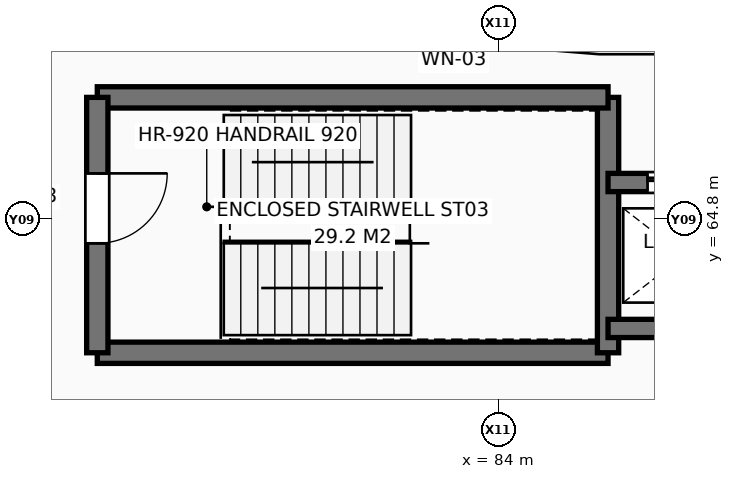
"""IFC4 building model, lengths in metres.
Left out: names, types, materials, properties, quantities, classifications, styles, units other than length and angle.
Written with IfcOpenShell. Run it as: python <this file> out.ifc"""

import sys

from ifc_helpers import new_model, si_unit, direction, frame, frame_2d, origin, place, context, subcontext, project, spatial, rectangle, extrude, element, fill, save


model = new_model("IFC4")
c1 = context("Model", 3, precision=1e-05, world=origin(), true_north=direction((0.0, 1.0)))
c2 = subcontext(c1, "Body", "Model", "MODEL_VIEW")
j1 = project(units=[si_unit("LENGTHUNIT", "METRE"), si_unit("PLANEANGLEUNIT", "RADIAN")], contexts=[c1])
p1 = place(None, origin())
s1 = spatial("IfcSite", under=j1, at=p1, CompositionType="ELEMENT")
p2 = place(p1, origin())
s2 = spatial("IfcBuilding", under=s1, at=p2, CompositionType="ELEMENT")
p3 = place(p2, frame((0.0, 0.0, 22.2)))
s3 = spatial("IfcBuildingStorey", under=s2, at=p3, CompositionType="ELEMENT", Elevation=22.2)
p4 = place(p3, frame((79.171, 68.104, 0.0), z_axis=(0.0, 0.0, 1.0), x_axis=(0.999197261913, -0.040060351782, 0.0)))
e1 = element("IfcWall", 1, at=p4, inside=s3, PredefinedType="SOLIDWALL", context=c2, shape_type="SweptSolid", body=[
    extrude(rectangle(XDim=13.097, YDim=0.34, at=frame_2d((6.548, 0.0))), origin(), (0.0, 0.0, 1.0), 3.387),
])
p5 = place(p4, frame((3.365, 0.0, 0.9)))
e2 = element("IfcOpeningElement", 2, at=p5, cuts=e1, PredefinedType="OPENING", context=c2, shape_type="SweptSolid", body=[
    extrude(rectangle(XDim=1.5, YDim=2.1, at=frame_2d((0.75, 1.05))), frame((0.0, 0.18, 0.0), z_axis=(0.0, -1.0, 0.0), x_axis=(1.0, 0.0, 0.0)), (0.0, 0.0, 1.0), 0.36),
])
p6 = place(p4, frame((8.231, 0.0, 0.9)))
e3 = element("IfcOpeningElement", 3, at=p6, cuts=e1, PredefinedType="OPENING", context=c2, shape_type="SweptSolid", body=[
    extrude(rectangle(XDim=1.5, YDim=2.1, at=frame_2d((0.75, 1.05))), frame((0.0, 0.18, 0.0), z_axis=(0.0, -1.0, 0.0), x_axis=(1.0, 0.0, 0.0)), (0.0, 0.0, 1.0), 0.36),
])
p7 = place(p3, frame((77.4, 62.6, 0.0), z_axis=(0.0, 0.0, 1.0), x_axis=(1.0, 0.0, 0.0)))
e4 = element("IfcWall", 4, at=p7, inside=s3, PredefinedType="SHEAR", context=c2, shape_type="SweptSolid", body=[
    extrude(rectangle(XDim=8.4, YDim=0.35, at=frame_2d((4.2, 0.0))), origin(), (0.0, 0.0, 1.0), 3.92),
])
p8 = place(p3, frame((85.8, 62.6, 0.0), z_axis=(0.0, 0.0, 1.0), x_axis=(0.0, 1.0, 0.0)))
e5 = element("IfcWall", 5, at=p8, inside=s3, PredefinedType="SHEAR", context=c2, shape_type="SweptSolid", body=[
    extrude(rectangle(XDim=4.2, YDim=0.35, at=frame_2d((2.1, 0.0))), origin(), (0.0, 0.0, 1.0), 3.92),
])
p9 = place(p3, frame((85.8, 66.8, 0.0), z_axis=(0.0, 0.0, 1.0), x_axis=(-1.0, 0.0, 0.0)))
e6 = element("IfcWall", 6, at=p9, inside=s3, PredefinedType="SHEAR", context=c2, shape_type="SweptSolid", body=[
    extrude(rectangle(XDim=8.4, YDim=0.35, at=frame_2d((4.2, 0.0))), origin(), (0.0, 0.0, 1.0), 3.92),
])
p10 = place(p3, frame((77.4, 66.8, 0.0), z_axis=(0.0, 0.0, 1.0), x_axis=(0.0, -1.0, 0.0)))
e7 = element("IfcWall", 7, at=p10, inside=s3, PredefinedType="SHEAR", context=c2, shape_type="SweptSolid", body=[
    extrude(rectangle(XDim=4.2, YDim=0.35, at=frame_2d((2.1, 0.0))), origin(), (0.0, 0.0, 1.0), 3.92),
])
p11 = place(p10, frame((1.25, 0.0, 0.0)))
e8 = element("IfcOpeningElement", 8, at=p11, cuts=e7, PredefinedType="OPENING", context=c2, shape_type="SweptSolid", body=[
    extrude(rectangle(XDim=1.15, YDim=2.2, at=frame_2d((0.575, 1.1))), frame((0.0, 0.185, 0.0), z_axis=(0.0, -1.0, 0.0), x_axis=(1.0, 0.0, 0.0)), (0.0, 0.0, 1.0), 0.37),
])
p12 = place(p3, frame((88.3, 65.4, 0.0), z_axis=(0.0, 0.0, 1.0), x_axis=(-1.0, 0.0, 0.0)))
e9 = element("IfcWall", 9, at=p12, inside=s3, PredefinedType="SHEAR", context=c2, shape_type="SweptSolid", body=[
    extrude(rectangle(XDim=2.5, YDim=0.3, at=frame_2d((1.25, 0.0))), origin(), (0.0, 0.0, 1.0), 3.92),
])
p13 = place(p12, frame((0.65, 0.0, 0.0)))
e10 = element("IfcOpeningElement", 10, at=p13, cuts=e9, PredefinedType="OPENING", context=c2, shape_type="SweptSolid", body=[
    extrude(rectangle(XDim=1.2, YDim=2.25, at=frame_2d((0.6, 1.125))), frame((0.0, 0.16, 0.0), z_axis=(0.0, -1.0, 0.0), x_axis=(1.0, 0.0, 0.0)), (0.0, 0.0, 1.0), 0.32),
])
p14 = place(p3, frame((85.8, 63.0, 0.0), z_axis=(0.0, 0.0, 1.0), x_axis=(1.0, 0.0, 0.0)))
e11 = element("IfcWall", 11, at=p14, inside=s3, PredefinedType="SHEAR", context=c2, shape_type="SweptSolid", body=[
    extrude(rectangle(XDim=2.5, YDim=0.3, at=frame_2d((1.25, 0.0))), origin(), (0.0, 0.0, 1.0), 3.92),
])
p15 = place(p11, origin())
e12 = element("IfcDoor", 12, at=p15, inside=s3, OperationType="SINGLE_SWING_LEFT", PredefinedType="DOOR", context=c2, shape_type="SweptSolid", body=[
    extrude(rectangle(XDim=1.15, YDim=2.2, at=frame_2d((0.575, 1.1))), frame((0.0, 0.025, 0.0), z_axis=(0.0, -1.0, 0.0), x_axis=(1.0, 0.0, 0.0)), (0.0, 0.0, 1.0), 0.05),
])
fill(e8, e12)
p16 = place(p13, origin())
e13 = element("IfcDoor", 13, at=p16, inside=s3, OperationType="SLIDING_TO_LEFT", PredefinedType="DOOR", context=c2, shape_type="SweptSolid", body=[
    extrude(rectangle(XDim=1.2, YDim=2.25, at=frame_2d((0.6, 1.125))), frame((0.0, 0.025, 0.0), z_axis=(0.0, -1.0, 0.0), x_axis=(1.0, 0.0, 0.0)), (0.0, 0.0, 1.0), 0.05),
])
fill(e10, e13)
save(model, sys.argv[1])
